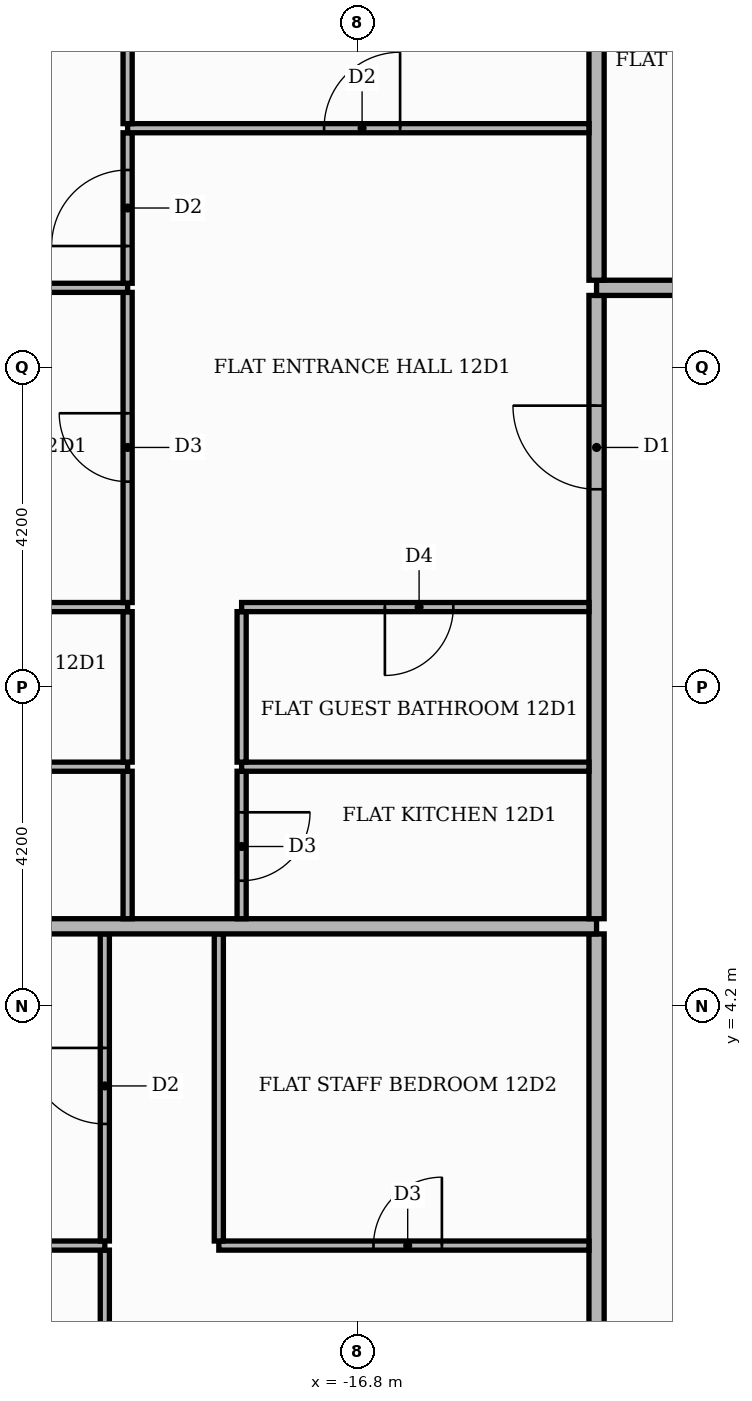
"""IFC4 building model, lengths in metres.
Left out: names, types, materials, properties, quantities, classifications, styles, units other than length and angle.
Written with IfcOpenShell. Run it as: python <this file> out.ifc"""

import sys

from ifc_helpers import new_model, si_unit, direction, frame, frame_2d, origin, place, context, subcontext, project, spatial, rectangle, extrude, element, fill, save


model = new_model("IFC4")
c1 = context("Model", 3, precision=1e-05, world=origin(), true_north=direction((0.0, 1.0)))
c2 = subcontext(c1, "Body", "Model", "MODEL_VIEW")
j1 = project(units=[si_unit("LENGTHUNIT", "METRE"), si_unit("PLANEANGLEUNIT", "RADIAN")], contexts=[c1])
p1 = place(None, origin())
s1 = spatial("IfcSite", under=j1, at=p1, CompositionType="ELEMENT")
p2 = place(p1, origin())
s2 = spatial("IfcBuilding", under=s1, at=p2, CompositionType="ELEMENT")
p3 = place(p2, frame((0.0, 0.0, 54.3)))
s3 = spatial("IfcBuildingStorey", under=s2, at=p3, CompositionType="ELEMENT", Elevation=54.3)
p4 = place(p3, frame((-13.65, -13.55, 0.0), z_axis=(0.0, 0.0, 1.0), x_axis=(0.0, 1.0, 0.0)))
e1 = element("IfcWall", 1, at=p4, inside=s3, PredefinedType="PARTITIONING", context=c2, shape_type="SweptSolid", body=[
    extrude(rectangle(XDim=18.7, YDim=0.2, at=frame_2d((9.35, 0.0))), origin(), (0.0, 0.0, 1.0), 3.48),
])
p5 = place(p4, frame((11.95, 0.0, 0.0)))
e2 = element("IfcOpeningElement", 2, at=p5, cuts=e1, PredefinedType="OPENING", context=c2, shape_type="SweptSolid", body=[
    extrude(rectangle(XDim=1.1, YDim=2.4, at=frame_2d((0.55, 1.2))), frame((0.0, 0.11, 0.0), z_axis=(0.0, -1.0, 0.0), x_axis=(1.0, 0.0, 0.0)), (0.0, 0.0, 1.0), 0.22),
])
p6 = place(p3, frame((-20.12, -3.09, 0.0), z_axis=(0.0, 0.0, 1.0), x_axis=(0.0, 1.0, 0.0)))
e3 = element("IfcWall", 3, at=p6, inside=s3, PredefinedType="PARTITIONING", context=c2, shape_type="SweptSolid", body=[
    extrude(rectangle(XDim=4.08, YDim=0.12, at=frame_2d((2.04, 0.0))), origin(), (0.0, 0.0, 1.0), 3.48),
])
p7 = place(p6, frame((1.59, 0.0, 0.0)))
e4 = element("IfcOpeningElement", 4, at=p7, cuts=e3, PredefinedType="OPENING", context=c2, shape_type="SweptSolid", body=[
    extrude(rectangle(XDim=0.9, YDim=2.1, at=frame_2d((0.45, 1.05))), frame((0.0, 0.07, 0.0), z_axis=(0.0, -1.0, 0.0), x_axis=(1.0, 0.0, 0.0)), (0.0, 0.0, 1.0), 0.14),
])
p8 = place(p3, frame((-25.42, 1.05, 0.0), z_axis=(0.0, 0.0, 1.0), x_axis=(1.0, 0.0, 0.0)))
e5 = element("IfcWall", 5, at=p8, inside=s3, PredefinedType="PARTITIONING", context=c2, shape_type="SweptSolid", body=[
    extrude(rectangle(XDim=5.3, YDim=0.12, at=frame_2d((2.65, 0.0))), origin(), (0.0, 0.0, 1.0), 3.48),
])
p9 = place(p3, frame((-18.62, 1.05, 0.0), z_axis=(0.0, 0.0, 1.0), x_axis=(1.0, 0.0, 0.0)))
e6 = element("IfcWall", 6, at=p9, inside=s3, PredefinedType="PARTITIONING", context=c2, shape_type="SweptSolid", body=[
    extrude(rectangle(XDim=4.87, YDim=0.12, at=frame_2d((2.435, 0.0))), origin(), (0.0, 0.0, 1.0), 3.48),
])
p10 = place(p9, frame((2.035, 0.0, 0.0)))
e7 = element("IfcOpeningElement", 7, at=p10, cuts=e6, PredefinedType="OPENING", context=c2, shape_type="SweptSolid", body=[
    extrude(rectangle(XDim=0.9, YDim=2.1, at=frame_2d((0.45, 1.05))), frame((0.0, 0.07, 0.0), z_axis=(0.0, -1.0, 0.0), x_axis=(1.0, 0.0, 0.0)), (0.0, 0.0, 1.0), 0.14),
])
p11 = place(p3, frame((-20.12, 1.11, 0.0), z_axis=(0.0, 0.0, 1.0), x_axis=(0.0, 1.0, 0.0)))
e8 = element("IfcWall", 8, at=p11, inside=s3, PredefinedType="PARTITIONING", context=c2, shape_type="SweptSolid", body=[
    extrude(rectangle(XDim=4.04, YDim=0.12, at=frame_2d((2.02, 0.0))), origin(), (0.0, 0.0, 1.0), 3.48),
])
p12 = place(p11, frame((1.54, 0.0, 0.0)))
e9 = element("IfcOpeningElement", 9, at=p12, cuts=e8, PredefinedType="OPENING", context=c2, shape_type="SweptSolid", body=[
    extrude(rectangle(XDim=1.0, YDim=2.1, at=frame_2d((0.5, 1.05))), frame((0.0, 0.07, 0.0), z_axis=(0.0, -1.0, 0.0), x_axis=(1.0, 0.0, 0.0)), (0.0, 0.0, 1.0), 0.14),
])
p13 = place(p3, frame((-18.62, 1.11, 0.0), z_axis=(0.0, 0.0, 1.0), x_axis=(0.0, 1.0, 0.0)))
e10 = element("IfcWall", 10, at=p13, inside=s3, PredefinedType="PARTITIONING", context=c2, shape_type="SweptSolid", body=[
    extrude(rectangle(XDim=4.04, YDim=0.12, at=frame_2d((2.02, 0.0))), origin(), (0.0, 0.0, 1.0), 3.48),
])
p14 = place(p3, frame((-25.42, 5.25, 0.0), z_axis=(0.0, 0.0, 1.0), x_axis=(1.0, 0.0, 0.0)))
e11 = element("IfcWall", 11, at=p14, inside=s3, PredefinedType="PARTITIONING", context=c2, shape_type="SweptSolid", body=[
    extrude(rectangle(XDim=11.77, YDim=0.2, at=frame_2d((5.885, 0.0))), origin(), (0.0, 0.0, 1.0), 3.48),
])
p15 = place(p3, frame((-19.82, 5.35, 0.0), z_axis=(0.0, 0.0, 1.0), x_axis=(0.0, 1.0, 0.0)))
e12 = element("IfcWall", 12, at=p15, inside=s3, PredefinedType="PARTITIONING", context=c2, shape_type="SweptSolid", body=[
    extrude(rectangle(XDim=1.94, YDim=0.12, at=frame_2d((0.97, 0.0))), origin(), (0.0, 0.0, 1.0), 3.48),
])
p16 = place(p3, frame((-18.32, 5.35, 0.0), z_axis=(0.0, 0.0, 1.0), x_axis=(0.0, 1.0, 0.0)))
e13 = element("IfcWall", 13, at=p16, inside=s3, PredefinedType="PARTITIONING", context=c2, shape_type="SweptSolid", body=[
    extrude(rectangle(XDim=1.94, YDim=0.12, at=frame_2d((0.97, 0.0))), origin(), (0.0, 0.0, 1.0), 3.48),
])
p17 = place(p16, frame((0.5, 0.0, 0.0)))
e14 = element("IfcOpeningElement", 14, at=p17, cuts=e13, PredefinedType="OPENING", context=c2, shape_type="SweptSolid", body=[
    extrude(rectangle(XDim=0.9, YDim=2.1, at=frame_2d((0.45, 1.05))), frame((0.0, 0.07, 0.0), z_axis=(0.0, -1.0, 0.0), x_axis=(1.0, 0.0, 0.0)), (0.0, 0.0, 1.0), 0.14),
])
p18 = place(p3, frame((-13.65, 5.35, 0.0), z_axis=(0.0, 0.0, 1.0), x_axis=(0.0, 1.0, 0.0)))
e15 = element("IfcWall", 15, at=p18, inside=s3, PredefinedType="PARTITIONING", context=c2, shape_type="SweptSolid", body=[
    extrude(rectangle(XDim=8.2, YDim=0.2, at=frame_2d((4.1, 0.0))), origin(), (0.0, 0.0, 1.0), 3.48),
])
p19 = place(p18, frame((5.65, 0.0, 0.0)))
e16 = element("IfcOpeningElement", 16, at=p19, cuts=e15, PredefinedType="OPENING", context=c2, shape_type="SweptSolid", body=[
    extrude(rectangle(XDim=1.1, YDim=2.4, at=frame_2d((0.55, 1.2))), frame((0.0, 0.11, 0.0), z_axis=(0.0, -1.0, 0.0), x_axis=(1.0, 0.0, 0.0)), (0.0, 0.0, 1.0), 0.22),
])
p20 = place(p3, frame((-25.42, 7.35, 0.0), z_axis=(0.0, 0.0, 1.0), x_axis=(1.0, 0.0, 0.0)))
e17 = element("IfcWall", 17, at=p20, inside=s3, PredefinedType="PARTITIONING", context=c2, shape_type="SweptSolid", body=[
    extrude(rectangle(XDim=5.6, YDim=0.12, at=frame_2d((2.8, 0.0))), origin(), (0.0, 0.0, 1.0), 3.48),
])
p21 = place(p20, frame((2.2, 0.0, 0.0)))
e18 = element("IfcOpeningElement", 18, at=p21, cuts=e17, PredefinedType="OPENING", context=c2, shape_type="SweptSolid", body=[
    extrude(rectangle(XDim=0.9, YDim=2.1, at=frame_2d((0.45, 1.05))), frame((0.0, 0.07, 0.0), z_axis=(0.0, -1.0, 0.0), x_axis=(1.0, 0.0, 0.0)), (0.0, 0.0, 1.0), 0.14),
])
p22 = place(p3, frame((-18.32, 7.35, 0.0), z_axis=(0.0, 0.0, 1.0), x_axis=(1.0, 0.0, 0.0)))
e19 = element("IfcWall", 19, at=p22, inside=s3, PredefinedType="PARTITIONING", context=c2, shape_type="SweptSolid", body=[
    extrude(rectangle(XDim=4.57, YDim=0.12, at=frame_2d((2.285, 0.0))), origin(), (0.0, 0.0, 1.0), 3.48),
])
for number, where, z_axis, x_axis in (
    (20, (-19.82, 7.41, 0.0), (0.0, 0.0, 1.0), (0.0, 1.0, 0.0)),
    (21, (-18.32, 7.41, 0.0), (0.0, 0.0, 1.0), (0.0, 1.0, 0.0)),
):
    element("IfcWall", number, at=place(p3, frame(where, z_axis=z_axis, x_axis=x_axis)), inside=s3, PredefinedType="PARTITIONING", context=c2, shape_type="SweptSolid", body=[
        extrude(rectangle(XDim=1.98, YDim=0.12, at=frame_2d((0.99, 0.0))), origin(), (0.0, 0.0, 1.0), 3.48),
    ])
p23 = place(p3, frame((-25.42, 9.45, 0.0), z_axis=(0.0, 0.0, 1.0), x_axis=(1.0, 0.0, 0.0)))
e22 = element("IfcWall", 22, at=p23, inside=s3, PredefinedType="PARTITIONING", context=c2, shape_type="SweptSolid", body=[
    extrude(rectangle(XDim=5.6, YDim=0.12, at=frame_2d((2.8, 0.0))), origin(), (0.0, 0.0, 1.0), 3.48),
])
p24 = place(p23, frame((2.2, 0.0, 0.0)))
e23 = element("IfcOpeningElement", 23, at=p24, cuts=e22, PredefinedType="OPENING", context=c2, shape_type="SweptSolid", body=[
    extrude(rectangle(XDim=0.9, YDim=2.1, at=frame_2d((0.45, 1.05))), frame((0.0, 0.07, 0.0), z_axis=(0.0, -1.0, 0.0), x_axis=(1.0, 0.0, 0.0)), (0.0, 0.0, 1.0), 0.14),
])
p25 = place(p3, frame((-18.32, 9.45, 0.0), z_axis=(0.0, 0.0, 1.0), x_axis=(1.0, 0.0, 0.0)))
e24 = element("IfcWall", 24, at=p25, inside=s3, PredefinedType="PARTITIONING", context=c2, shape_type="SweptSolid", body=[
    extrude(rectangle(XDim=4.57, YDim=0.12, at=frame_2d((2.285, 0.0))), origin(), (0.0, 0.0, 1.0), 3.48),
])
p26 = place(p25, frame((1.885, 0.0, 0.0)))
e25 = element("IfcOpeningElement", 25, at=p26, cuts=e24, PredefinedType="OPENING", context=c2, shape_type="SweptSolid", body=[
    extrude(rectangle(XDim=0.9, YDim=2.1, at=frame_2d((0.45, 1.05))), frame((0.0, 0.07, 0.0), z_axis=(0.0, -1.0, 0.0), x_axis=(1.0, 0.0, 0.0)), (0.0, 0.0, 1.0), 0.14),
])
p27 = place(p3, frame((-19.82, 9.51, 0.0), z_axis=(0.0, 0.0, 1.0), x_axis=(0.0, 1.0, 0.0)))
e26 = element("IfcWall", 26, at=p27, inside=s3, PredefinedType="PARTITIONING", context=c2, shape_type="SweptSolid", body=[
    extrude(rectangle(XDim=4.08, YDim=0.12, at=frame_2d((2.04, 0.0))), origin(), (0.0, 0.0, 1.0), 3.48),
])
p28 = place(p27, frame((1.59, 0.0, 0.0)))
e27 = element("IfcOpeningElement", 27, at=p28, cuts=e26, PredefinedType="OPENING", context=c2, shape_type="SweptSolid", body=[
    extrude(rectangle(XDim=0.9, YDim=2.1, at=frame_2d((0.45, 1.05))), frame((0.0, 0.07, 0.0), z_axis=(0.0, -1.0, 0.0), x_axis=(1.0, 0.0, 0.0)), (0.0, 0.0, 1.0), 0.14),
])
p29 = place(p3, frame((-25.42, 13.65, 0.0), z_axis=(0.0, 0.0, 1.0), x_axis=(1.0, 0.0, 0.0)))
e28 = element("IfcWall", 28, at=p29, inside=s3, PredefinedType="PARTITIONING", context=c2, shape_type="SweptSolid", body=[
    extrude(rectangle(XDim=5.6, YDim=0.12, at=frame_2d((2.8, 0.0))), origin(), (0.0, 0.0, 1.0), 3.48),
])
p30 = place(p3, frame((-13.65, 13.65, 0.0), z_axis=(0.0, 0.0, 1.0), x_axis=(1.0, 0.0, 0.0)))
e29 = element("IfcWall", 29, at=p30, inside=s3, PredefinedType="PARTITIONING", context=c2, shape_type="SweptSolid", body=[
    extrude(rectangle(XDim=39.07, YDim=0.2, at=frame_2d((19.535, 0.0))), origin(), (0.0, 0.0, 1.0), 3.48),
])
p31 = place(p30, frame((24.65, 0.0, 0.0)))
e30 = element("IfcOpeningElement", 30, at=p31, cuts=e29, PredefinedType="OPENING", context=c2, shape_type="SweptSolid", body=[
    extrude(rectangle(XDim=1.1, YDim=2.4, at=frame_2d((0.55, 1.2))), frame((0.0, 0.11, 0.0), z_axis=(0.0, -1.0, 0.0), x_axis=(1.0, 0.0, 0.0)), (0.0, 0.0, 1.0), 0.22),
])
p32 = place(p30, frame((14.15, 0.0, 0.0)))
e31 = element("IfcOpeningElement", 31, at=p32, cuts=e29, PredefinedType="OPENING", context=c2, shape_type="SweptSolid", body=[
    extrude(rectangle(XDim=1.1, YDim=2.4, at=frame_2d((0.55, 1.2))), frame((0.0, 0.11, 0.0), z_axis=(0.0, -1.0, 0.0), x_axis=(1.0, 0.0, 0.0)), (0.0, 0.0, 1.0), 0.22),
])
p33 = place(p3, frame((-19.82, 13.71, 0.0), z_axis=(0.0, 0.0, 1.0), x_axis=(0.0, 1.0, 0.0)))
e32 = element("IfcWall", 32, at=p33, inside=s3, PredefinedType="PARTITIONING", context=c2, shape_type="SweptSolid", body=[
    extrude(rectangle(XDim=1.98, YDim=0.12, at=frame_2d((0.99, 0.0))), origin(), (0.0, 0.0, 1.0), 3.48),
])
p34 = place(p33, frame((0.49, 0.0, 0.0)))
e33 = element("IfcOpeningElement", 33, at=p34, cuts=e32, PredefinedType="OPENING", context=c2, shape_type="SweptSolid", body=[
    extrude(rectangle(XDim=1.0, YDim=2.1, at=frame_2d((0.5, 1.05))), frame((0.0, 0.07, 0.0), z_axis=(0.0, -1.0, 0.0), x_axis=(1.0, 0.0, 0.0)), (0.0, 0.0, 1.0), 0.14),
])
p35 = place(p3, frame((-13.65, 13.75, 0.0), z_axis=(0.0, 0.0, 1.0), x_axis=(0.0, 1.0, 0.0)))
e34 = element("IfcWall", 34, at=p35, inside=s3, PredefinedType="PARTITIONING", context=c2, shape_type="SweptSolid", body=[
    extrude(rectangle(XDim=11.67, YDim=0.2, at=frame_2d((5.835, 0.0))), origin(), (0.0, 0.0, 1.0), 3.48),
])
p36 = place(p3, frame((-19.82, 15.75, 0.0), z_axis=(0.0, 0.0, 1.0), x_axis=(1.0, 0.0, 0.0)))
e35 = element("IfcWall", 35, at=p36, inside=s3, PredefinedType="PARTITIONING", context=c2, shape_type="SweptSolid", body=[
    extrude(rectangle(XDim=6.07, YDim=0.12, at=frame_2d((3.035, 0.0))), origin(), (0.0, 0.0, 1.0), 3.48),
])
p37 = place(p36, frame((2.585, 0.0, 0.0)))
e36 = element("IfcOpeningElement", 36, at=p37, cuts=e35, PredefinedType="OPENING", context=c2, shape_type="SweptSolid", body=[
    extrude(rectangle(XDim=1.0, YDim=2.1, at=frame_2d((0.5, 1.05))), frame((0.0, 0.07, 0.0), z_axis=(0.0, -1.0, 0.0), x_axis=(1.0, 0.0, 0.0)), (0.0, 0.0, 1.0), 0.14),
])
p38 = place(p3, frame((-19.82, 15.81, 0.0), z_axis=(0.0, 0.0, 1.0), x_axis=(0.0, 1.0, 0.0)))
e37 = element("IfcWall", 37, at=p38, inside=s3, PredefinedType="PARTITIONING", context=c2, shape_type="SweptSolid", body=[
    extrude(rectangle(XDim=1.49, YDim=0.12, at=frame_2d((0.745, 0.0))), origin(), (0.0, 0.0, 1.0), 3.48),
])
p39 = place(p19, origin())
e38 = element("IfcDoor", 38, at=p39, inside=s3, OperationType="SINGLE_SWING_RIGHT", PredefinedType="DOOR", context=c2, shape_type="SweptSolid", body=[
    extrude(rectangle(XDim=1.1, YDim=2.4, at=frame_2d((0.55, 1.2))), frame((0.0, 0.025, 0.0), z_axis=(0.0, -1.0, 0.0), x_axis=(1.0, 0.0, 0.0)), (0.0, 0.0, 1.0), 0.05),
])
fill(e16, e38)
p40 = place(p37, origin())
e39 = element("IfcDoor", 39, at=p40, inside=s3, OperationType="SINGLE_SWING_RIGHT", PredefinedType="DOOR", context=c2, shape_type="SweptSolid", body=[
    extrude(rectangle(XDim=1.0, YDim=2.1, at=frame_2d((0.5, 1.05))), frame((0.0, 0.025, 0.0), z_axis=(0.0, -1.0, 0.0), x_axis=(1.0, 0.0, 0.0)), (0.0, 0.0, 1.0), 0.05),
])
fill(e36, e39)
p41 = place(p26, frame((0.9, 0.0, 0.0), z_axis=(0.0, 0.0, 1.0), x_axis=(-1.0, 0.0, 0.0)))
e40 = element("IfcDoor", 40, at=p41, inside=s3, OperationType="SINGLE_SWING_LEFT", PredefinedType="DOOR", context=c2, shape_type="SweptSolid", body=[
    extrude(rectangle(XDim=0.9, YDim=2.1, at=frame_2d((0.45, 1.05))), frame((0.0, 0.025, 0.0), z_axis=(0.0, -1.0, 0.0), x_axis=(1.0, 0.0, 0.0)), (0.0, 0.0, 1.0), 0.05),
])
fill(e25, e40)
p42 = place(p17, frame((0.9, 0.0, 0.0), z_axis=(0.0, 0.0, 1.0), x_axis=(-1.0, 0.0, 0.0)))
e41 = element("IfcDoor", 41, at=p42, inside=s3, OperationType="SINGLE_SWING_RIGHT", PredefinedType="DOOR", context=c2, shape_type="SweptSolid", body=[
    extrude(rectangle(XDim=0.9, YDim=2.1, at=frame_2d((0.45, 1.05))), frame((0.0, 0.025, 0.0), z_axis=(0.0, -1.0, 0.0), x_axis=(1.0, 0.0, 0.0)), (0.0, 0.0, 1.0), 0.05),
])
fill(e14, e41)
p43 = place(p34, origin())
e42 = element("IfcDoor", 42, at=p43, inside=s3, OperationType="SINGLE_SWING_LEFT", PredefinedType="DOOR", context=c2, shape_type="SweptSolid", body=[
    extrude(rectangle(XDim=1.0, YDim=2.1, at=frame_2d((0.5, 1.05))), frame((0.0, 0.025, 0.0), z_axis=(0.0, -1.0, 0.0), x_axis=(1.0, 0.0, 0.0)), (0.0, 0.0, 1.0), 0.05),
])
fill(e33, e42)
p44 = place(p28, origin())
e43 = element("IfcDoor", 43, at=p44, inside=s3, OperationType="SINGLE_SWING_RIGHT", PredefinedType="DOOR", context=c2, shape_type="SweptSolid", body=[
    extrude(rectangle(XDim=0.9, YDim=2.1, at=frame_2d((0.45, 1.05))), frame((0.0, 0.025, 0.0), z_axis=(0.0, -1.0, 0.0), x_axis=(1.0, 0.0, 0.0)), (0.0, 0.0, 1.0), 0.05),
])
fill(e27, e43)
p45 = place(p10, origin())
e44 = element("IfcDoor", 44, at=p45, inside=s3, OperationType="SINGLE_SWING_RIGHT", PredefinedType="DOOR", context=c2, shape_type="SweptSolid", body=[
    extrude(rectangle(XDim=0.9, YDim=2.1, at=frame_2d((0.45, 1.05))), frame((0.0, 0.025, 0.0), z_axis=(0.0, -1.0, 0.0), x_axis=(1.0, 0.0, 0.0)), (0.0, 0.0, 1.0), 0.05),
])
fill(e7, e44)
p46 = place(p12, origin())
e45 = element("IfcDoor", 45, at=p46, inside=s3, OperationType="SINGLE_SWING_RIGHT", PredefinedType="DOOR", context=c2, shape_type="SweptSolid", body=[
    extrude(rectangle(XDim=1.0, YDim=2.1, at=frame_2d((0.5, 1.05))), frame((0.0, 0.025, 0.0), z_axis=(0.0, -1.0, 0.0), x_axis=(1.0, 0.0, 0.0)), (0.0, 0.0, 1.0), 0.05),
])
fill(e9, e45)
save(model, sys.argv[1])
